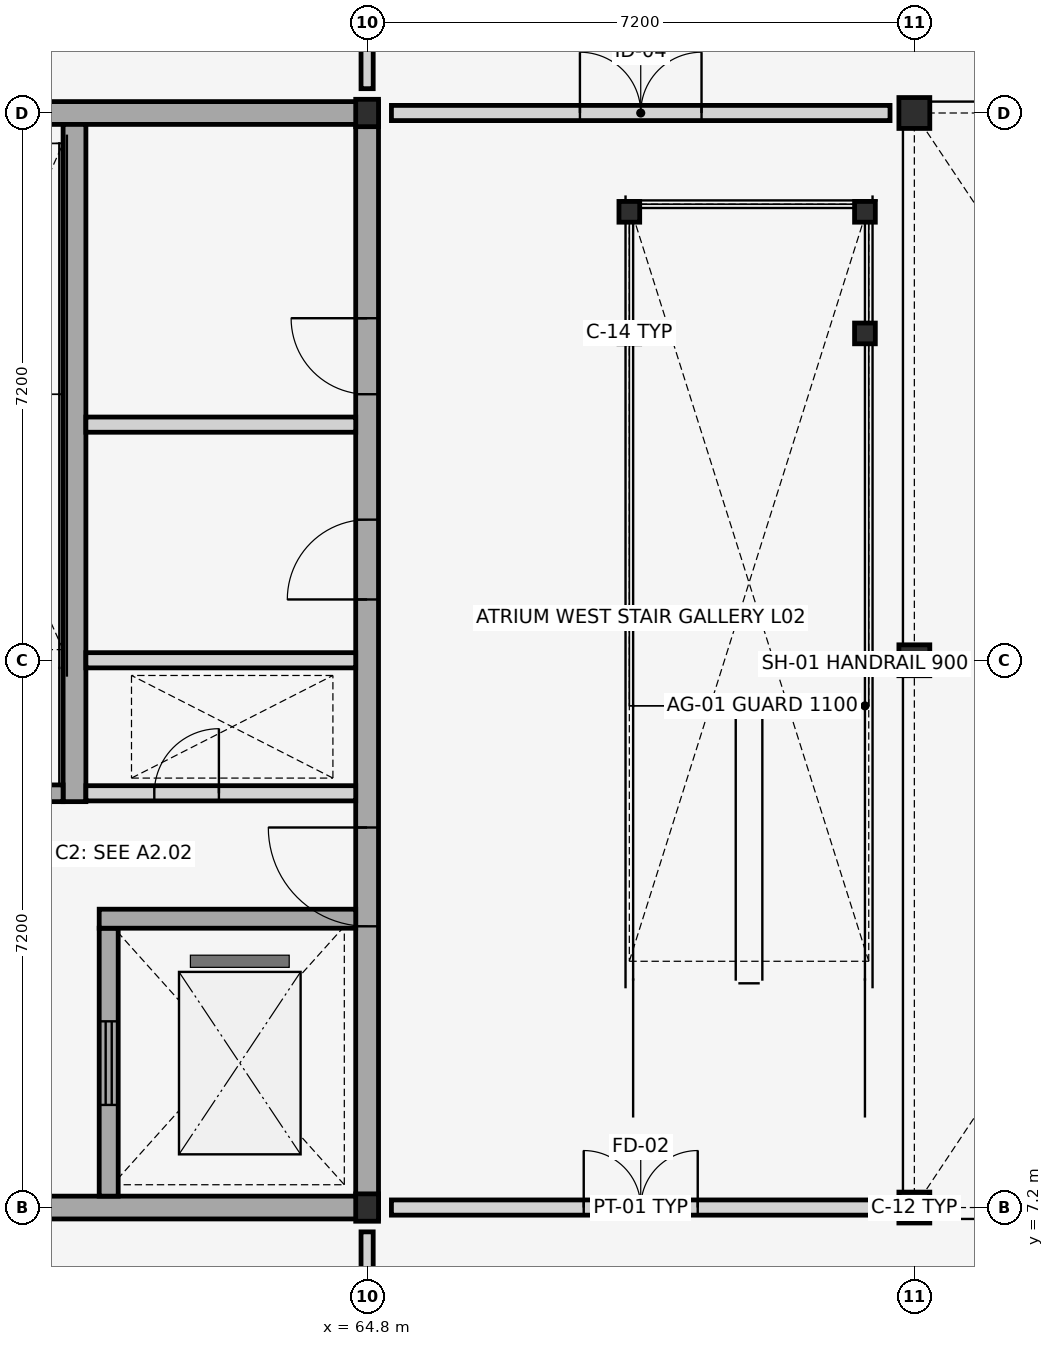
"""IFC4 building model, lengths in metres.
Left out: names, types, materials, properties, quantities, classifications, styles, units other than length and angle.
Written with IfcOpenShell. Run it as: python <this file> out.ifc"""

import sys

from ifc_helpers import new_model, si_unit, direction, frame, frame_2d, origin, origin_2d, place, context, subcontext, project, spatial, rectangle, hollow_circle, i_section, extrude, element, fill, save


model = new_model("IFC4")
c1 = context("Model", 3, precision=1e-05, world=origin(), true_north=direction((0.0, 1.0)))
c2 = subcontext(c1, "Body", "Model", "MODEL_VIEW")
j1 = project(units=[si_unit("LENGTHUNIT", "METRE"), si_unit("PLANEANGLEUNIT", "RADIAN")], contexts=[c1])
p1 = place(None, origin())
s1 = spatial("IfcSite", under=j1, at=p1, CompositionType="ELEMENT")
p2 = place(p1, origin())
s2 = spatial("IfcBuilding", under=s1, at=p2, CompositionType="ELEMENT")
p3 = place(p2, frame((0.0, 0.0, 8.7)))
s3 = spatial("IfcBuildingStorey", under=s2, at=p3, CompositionType="ELEMENT", Elevation=8.7)
for number, where, z_axis, x_axis in (
    (1, (64.8, 7.2, 0.0), (0.0, 0.0, 1.0), (1.0, 0.0, 0.0)),
    (2, (64.8, 21.6, 0.0), (0.0, 0.0, 1.0), (1.0, 0.0, 0.0)),
):
    element("IfcColumn", number, at=place(p3, frame(where, z_axis=z_axis, x_axis=x_axis)), inside=s3, PredefinedType="COLUMN", context=c2, shape_type="SweptSolid", body=[
        extrude(i_section(OverallWidth=0.3, OverallDepth=0.36, WebThickness=0.012, FlangeThickness=0.022, FilletRadius=0.027, at=origin_2d()), origin(), (0.0, 0.0, 1.0), 4.2),
    ])
for number, where, z_axis, x_axis in (
    (3, (72.0, 7.2, 0.0), (0.0, 0.0, 1.0), (0.0, 1.0, 0.0)),
    (4, (72.0, 14.4, 0.0), (0.0, 0.0, 1.0), (1.0, 0.0, 0.0)),
    (5, (72.0, 21.6, 0.0), (0.0, 0.0, 1.0), (0.0, 1.0, 0.0)),
):
    element("IfcColumn", number, at=place(p3, frame(where, z_axis=z_axis, x_axis=x_axis)), inside=s3, PredefinedType="COLUMN", context=c2, shape_type="SweptSolid", body=[
        extrude(hollow_circle(Radius=0.203, WallThickness=0.016, at=origin_2d()), origin(), (0.0, 0.0, 1.0), 4.2),
    ])
for number, where, z_axis, x_axis in (
    (6, (57.6, 7.2, 0.0), (0.0, 0.0, 1.0), (1.0, 0.0, 0.0)),
    (7, (57.6, 21.6, 0.0), (0.0, 0.0, 1.0), (1.0, 0.0, 0.0)),
):
    element("IfcWall", number, at=place(p3, frame(where, z_axis=z_axis, x_axis=x_axis)), inside=s3, PredefinedType="SHEAR", context=c2, shape_type="SweptSolid", body=[
        extrude(rectangle(XDim=7.35, YDim=0.3, at=frame_2d((3.675, 0.0))), origin(), (0.0, 0.0, 1.0), 3.96),
    ])
p4 = place(p3, frame((64.8, 7.35, 0.0), z_axis=(0.0, 0.0, 1.0), x_axis=(0.0, 1.0, 0.0)))
e8 = element("IfcWall", 8, at=p4, inside=s3, PredefinedType="SHEAR", context=c2, shape_type="SweptSolid", body=[
    extrude(rectangle(XDim=14.1, YDim=0.3, at=frame_2d((7.05, 0.0))), origin(), (0.0, 0.0, 1.0), 3.96),
])
p5 = place(p4, frame((3.55, 0.0, 0.0)))
e9 = element("IfcOpeningElement", 9, at=p5, cuts=e8, PredefinedType="OPENING", context=c2, shape_type="SweptSolid", body=[
    extrude(rectangle(XDim=1.3, YDim=2.2, at=frame_2d((0.65, 1.1))), frame((0.0, 0.16, 0.0), z_axis=(0.0, -1.0, 0.0), x_axis=(1.0, 0.0, 0.0)), (0.0, 0.0, 1.0), 0.32),
])
p6 = place(p4, frame((7.85, 0.0, 0.0)))
e10 = element("IfcOpeningElement", 10, at=p6, cuts=e8, PredefinedType="OPENING", context=c2, shape_type="SweptSolid", body=[
    extrude(rectangle(XDim=1.05, YDim=2.15, at=frame_2d((0.525, 1.075))), frame((0.0, 0.16, 0.0), z_axis=(0.0, -1.0, 0.0), x_axis=(1.0, 0.0, 0.0)), (0.0, 0.0, 1.0), 0.32),
])
p7 = place(p4, frame((10.55, 0.0, 0.0)))
e11 = element("IfcOpeningElement", 11, at=p7, cuts=e8, PredefinedType="OPENING", context=c2, shape_type="SweptSolid", body=[
    extrude(rectangle(XDim=1.0, YDim=2.15, at=frame_2d((0.5, 1.075))), frame((0.0, 0.16, 0.0), z_axis=(0.0, -1.0, 0.0), x_axis=(1.0, 0.0, 0.0)), (0.0, 0.0, 1.0), 0.32),
])
p8 = place(p3, frame((61.4, 7.35, 0.0), z_axis=(0.0, 0.0, 1.0), x_axis=(0.0, 1.0, 0.0)))
e12 = element("IfcWall", 12, at=p8, inside=s3, PredefinedType="SHEAR", context=c2, shape_type="SweptSolid", body=[
    extrude(rectangle(XDim=3.525, YDim=0.25, at=frame_2d((1.762, 0.0))), origin(), (0.0, 0.0, 1.0), 3.96),
])
p9 = place(p8, frame((1.2, 0.0, 0.0)))
e13 = element("IfcOpeningElement", 13, at=p9, cuts=e12, PredefinedType="OPENING", context=c2, shape_type="SweptSolid", body=[
    extrude(rectangle(XDim=1.1, YDim=2.15, at=frame_2d((0.55, 1.075))), frame((0.0, 0.135, 0.0), z_axis=(0.0, -1.0, 0.0), x_axis=(1.0, 0.0, 0.0)), (0.0, 0.0, 1.0), 0.27),
])
p10 = place(p3, frame((60.95, 12.54, 0.0), z_axis=(0.0, 0.0, 1.0), x_axis=(0.0, 1.0, 0.0)))
e14 = element("IfcWall", 14, at=p10, inside=s3, PredefinedType="SHEAR", context=c2, shape_type="SweptSolid", body=[
    extrude(rectangle(XDim=8.91, YDim=0.3, at=frame_2d((4.455, 0.0))), origin(), (0.0, 0.0, 1.0), 3.96),
])
p11 = place(p3, frame((61.1, 12.65, 0.0), z_axis=(0.0, 0.0, 1.0), x_axis=(1.0, 0.0, 0.0)))
e15 = element("IfcWall", 15, at=p11, inside=s3, PredefinedType="PLUMBINGWALL", context=c2, shape_type="SweptSolid", body=[
    extrude(rectangle(XDim=3.55, YDim=0.2, at=frame_2d((1.775, 0.0))), origin(), (0.0, 0.0, 1.0), 3.38),
])
p12 = place(p11, frame((0.9, 0.0, 0.0)))
e16 = element("IfcOpeningElement", 16, at=p12, cuts=e15, PredefinedType="OPENING", context=c2, shape_type="SweptSolid", body=[
    extrude(rectangle(XDim=0.85, YDim=2.05, at=frame_2d((0.425, 1.025))), frame((0.0, 0.11, 0.0), z_axis=(0.0, -1.0, 0.0), x_axis=(1.0, 0.0, 0.0)), (0.0, 0.0, 1.0), 0.22),
])
p13 = place(p3, frame((57.9, 12.65, 0.0), z_axis=(0.0, 0.0, 1.0), x_axis=(1.0, 0.0, 0.0)))
e17 = element("IfcWall", 17, at=p13, inside=s3, PredefinedType="SHEAR", context=c2, shape_type="SweptSolid", body=[
    extrude(rectangle(XDim=2.9, YDim=0.22, at=frame_2d((1.45, 0.0))), origin(), (0.0, 0.0, 1.0), 3.96),
])
p14 = place(p13, frame((0.75, 0.0, 0.0)))
e18 = element("IfcOpeningElement", 18, at=p14, cuts=e17, PredefinedType="OPENING", context=c2, shape_type="SweptSolid", body=[
    extrude(rectangle(XDim=1.3, YDim=2.2, at=frame_2d((0.65, 1.1))), frame((0.0, 0.12, 0.0), z_axis=(0.0, -1.0, 0.0), x_axis=(1.0, 0.0, 0.0)), (0.0, 0.0, 1.0), 0.24),
])
p15 = place(p3, frame((61.275, 11.0, 0.0), z_axis=(0.0, 0.0, 1.0), x_axis=(1.0, 0.0, 0.0)))
e19 = element("IfcWall", 19, at=p15, inside=s3, PredefinedType="SHEAR", context=c2, shape_type="SweptSolid", body=[
    extrude(rectangle(XDim=3.375, YDim=0.25, at=frame_2d((1.688, 0.0))), origin(), (0.0, 0.0, 1.0), 3.96),
])
for number, where, z_axis, x_axis in (
    (20, (61.1, 14.4, 0.0), (0.0, 0.0, 1.0), (1.0, 0.0, 0.0)),
    (21, (61.1, 17.5, 0.0), (0.0, 0.0, 1.0), (1.0, 0.0, 0.0)),
):
    element("IfcWall", number, at=place(p3, frame(where, z_axis=z_axis, x_axis=x_axis)), inside=s3, PredefinedType="PLUMBINGWALL", context=c2, shape_type="SweptSolid", body=[
        extrude(rectangle(XDim=3.55, YDim=0.2, at=frame_2d((1.775, 0.0))), origin(), (0.0, 0.0, 1.0), 3.38),
    ])
for number, where, z_axis, x_axis in (
    (22, (68.25, 18.7, 0.0), (0.0, 0.0, 1.0), (1.0, 0.0, 0.0)),
    (23, (71.35, 18.7, 0.0), (0.0, 0.0, 1.0), (1.0, 0.0, 0.0)),
    (24, (68.25, 20.3, 0.0), (0.0, 0.0, 1.0), (1.0, 0.0, 0.0)),
    (25, (71.35, 20.3, 0.0), (0.0, 0.0, 1.0), (1.0, 0.0, 0.0)),
):
    element("IfcColumn", number, at=place(p3, frame(where, z_axis=z_axis, x_axis=x_axis)), inside=s3, PredefinedType="COLUMN", context=c2, shape_type="SweptSolid", body=[
        extrude(hollow_circle(Radius=0.136, WallThickness=0.012, at=origin_2d()), origin(), (0.0, 0.0, 1.0), 4.2),
    ])
p16 = place(p3, frame((65.12, 7.2, 0.0), z_axis=(0.0, 0.0, 1.0), x_axis=(1.0, 0.0, 0.0)))
e26 = element("IfcWall", 26, at=p16, inside=s3, PredefinedType="PARTITIONING", context=c2, shape_type="SweptSolid", body=[
    extrude(rectangle(XDim=6.56, YDim=0.2, at=frame_2d((3.28, 0.0))), origin(), (0.0, 0.0, 1.0), 3.15),
])
p17 = place(p16, frame((2.53, 0.0, 0.0)))
e27 = element("IfcOpeningElement", 27, at=p17, cuts=e26, PredefinedType="OPENING", context=c2, shape_type="SweptSolid", body=[
    extrude(rectangle(XDim=1.5, YDim=2.25, at=frame_2d((0.75, 1.125))), frame((0.0, 0.11, 0.0), z_axis=(0.0, -1.0, 0.0), x_axis=(1.0, 0.0, 0.0)), (0.0, 0.0, 1.0), 0.22),
])
p18 = place(p3, frame((65.12, 21.6, 0.0), z_axis=(0.0, 0.0, 1.0), x_axis=(1.0, 0.0, 0.0)))
e28 = element("IfcWall", 28, at=p18, inside=s3, PredefinedType="PARTITIONING", context=c2, shape_type="SweptSolid", body=[
    extrude(rectangle(XDim=6.56, YDim=0.2, at=frame_2d((3.28, 0.0))), origin(), (0.0, 0.0, 1.0), 3.15),
])
p19 = place(p18, frame((2.48, 0.0, 0.0)))
e29 = element("IfcOpeningElement", 29, at=p19, cuts=e28, PredefinedType="OPENING", context=c2, shape_type="SweptSolid", body=[
    extrude(rectangle(XDim=1.6, YDim=2.35, at=frame_2d((0.8, 1.175))), frame((0.0, 0.11, 0.0), z_axis=(0.0, -1.0, 0.0), x_axis=(1.0, 0.0, 0.0)), (0.0, 0.0, 1.0), 0.22),
])
p20 = place(p3, frame((64.8, 0.32, 0.0), z_axis=(0.0, 0.0, 1.0), x_axis=(0.0, 1.0, 0.0)))
e30 = element("IfcWall", 30, at=p20, inside=s3, PredefinedType="PARTITIONING", context=c2, shape_type="SweptSolid", body=[
    extrude(rectangle(XDim=6.56, YDim=0.16, at=frame_2d((3.28, 0.0))), origin(), (0.0, 0.0, 1.0), 3.15),
])
p21 = place(p20, frame((2.705, 0.0, 0.0)))
e31 = element("IfcOpeningElement", 31, at=p21, cuts=e30, PredefinedType="OPENING", context=c2, shape_type="SweptSolid", body=[
    extrude(rectangle(XDim=1.15, YDim=2.2, at=frame_2d((0.575, 1.1))), frame((0.0, 0.09, 0.0), z_axis=(0.0, -1.0, 0.0), x_axis=(1.0, 0.0, 0.0)), (0.0, 0.0, 1.0), 0.18),
])
p22 = place(p3, frame((64.8, 21.92, 0.0), z_axis=(0.0, 0.0, 1.0), x_axis=(0.0, 1.0, 0.0)))
e32 = element("IfcWall", 32, at=p22, inside=s3, PredefinedType="PARTITIONING", context=c2, shape_type="SweptSolid", body=[
    extrude(rectangle(XDim=6.56, YDim=0.16, at=frame_2d((3.28, 0.0))), origin(), (0.0, 0.0, 1.0), 3.15),
])
p23 = place(p22, frame((2.805, 0.0, 0.0)))
e33 = element("IfcOpeningElement", 33, at=p23, cuts=e32, PredefinedType="OPENING", context=c2, shape_type="SweptSolid", body=[
    extrude(rectangle(XDim=0.95, YDim=2.1, at=frame_2d((0.475, 1.05))), frame((0.0, 0.09, 0.0), z_axis=(0.0, -1.0, 0.0), x_axis=(1.0, 0.0, 0.0)), (0.0, 0.0, 1.0), 0.18),
])
p24 = place(p5, origin())
e34 = element("IfcDoor", 34, at=p24, inside=s3, OperationType="SINGLE_SWING_RIGHT", PredefinedType="DOOR", context=c2, shape_type="SweptSolid", body=[
    extrude(rectangle(XDim=1.3, YDim=2.2, at=frame_2d((0.65, 1.1))), frame((0.0, 0.025, 0.0), z_axis=(0.0, -1.0, 0.0), x_axis=(1.0, 0.0, 0.0)), (0.0, 0.0, 1.0), 0.05),
])
fill(e9, e34)
p25 = place(p6, origin())
e35 = element("IfcDoor", 35, at=p25, inside=s3, OperationType="SINGLE_SWING_LEFT", PredefinedType="DOOR", context=c2, shape_type="SweptSolid", body=[
    extrude(rectangle(XDim=1.05, YDim=2.15, at=frame_2d((0.525, 1.075))), frame((0.0, 0.025, 0.0), z_axis=(0.0, -1.0, 0.0), x_axis=(1.0, 0.0, 0.0)), (0.0, 0.0, 1.0), 0.05),
])
fill(e10, e35)
p26 = place(p7, origin())
e36 = element("IfcDoor", 36, at=p26, inside=s3, OperationType="SINGLE_SWING_RIGHT", PredefinedType="DOOR", context=c2, shape_type="SweptSolid", body=[
    extrude(rectangle(XDim=1.0, YDim=2.15, at=frame_2d((0.5, 1.075))), frame((0.0, 0.025, 0.0), z_axis=(0.0, -1.0, 0.0), x_axis=(1.0, 0.0, 0.0)), (0.0, 0.0, 1.0), 0.05),
])
fill(e11, e36)
p27 = place(p9, origin())
e37 = element("IfcDoor", 37, at=p27, inside=s3, OperationType="SLIDING_TO_LEFT", PredefinedType="DOOR", context=c2, shape_type="SweptSolid", body=[
    extrude(rectangle(XDim=1.1, YDim=2.15, at=frame_2d((0.55, 1.075))), frame((0.0, 0.025, 0.0), z_axis=(0.0, -1.0, 0.0), x_axis=(1.0, 0.0, 0.0)), (0.0, 0.0, 1.0), 0.05),
])
fill(e13, e37)
p28 = place(p12, origin())
e38 = element("IfcDoor", 38, at=p28, inside=s3, OperationType="SINGLE_SWING_RIGHT", PredefinedType="TRAPDOOR", context=c2, shape_type="SweptSolid", body=[
    extrude(rectangle(XDim=0.85, YDim=2.05, at=frame_2d((0.425, 1.025))), frame((0.0, 0.025, 0.0), z_axis=(0.0, -1.0, 0.0), x_axis=(1.0, 0.0, 0.0)), (0.0, 0.0, 1.0), 0.05),
])
fill(e16, e38)
p29 = place(p17, origin())
e39 = element("IfcDoor", 39, at=p29, inside=s3, OperationType="DOUBLE_DOOR_SINGLE_SWING", PredefinedType="DOOR", context=c2, shape_type="SweptSolid", body=[
    extrude(rectangle(XDim=1.5, YDim=2.25, at=frame_2d((0.75, 1.125))), frame((0.0, 0.025, 0.0), z_axis=(0.0, -1.0, 0.0), x_axis=(1.0, 0.0, 0.0)), (0.0, 0.0, 1.0), 0.05),
])
fill(e27, e39)
p30 = place(p19, origin())
e40 = element("IfcDoor", 40, at=p30, inside=s3, OperationType="DOUBLE_DOOR_SINGLE_SWING", PredefinedType="DOOR", context=c2, shape_type="SweptSolid", body=[
    extrude(rectangle(XDim=1.6, YDim=2.35, at=frame_2d((0.8, 1.175))), frame((0.0, 0.025, 0.0), z_axis=(0.0, -1.0, 0.0), x_axis=(1.0, 0.0, 0.0)), (0.0, 0.0, 1.0), 0.05),
])
fill(e29, e40)
save(model, sys.argv[1])
